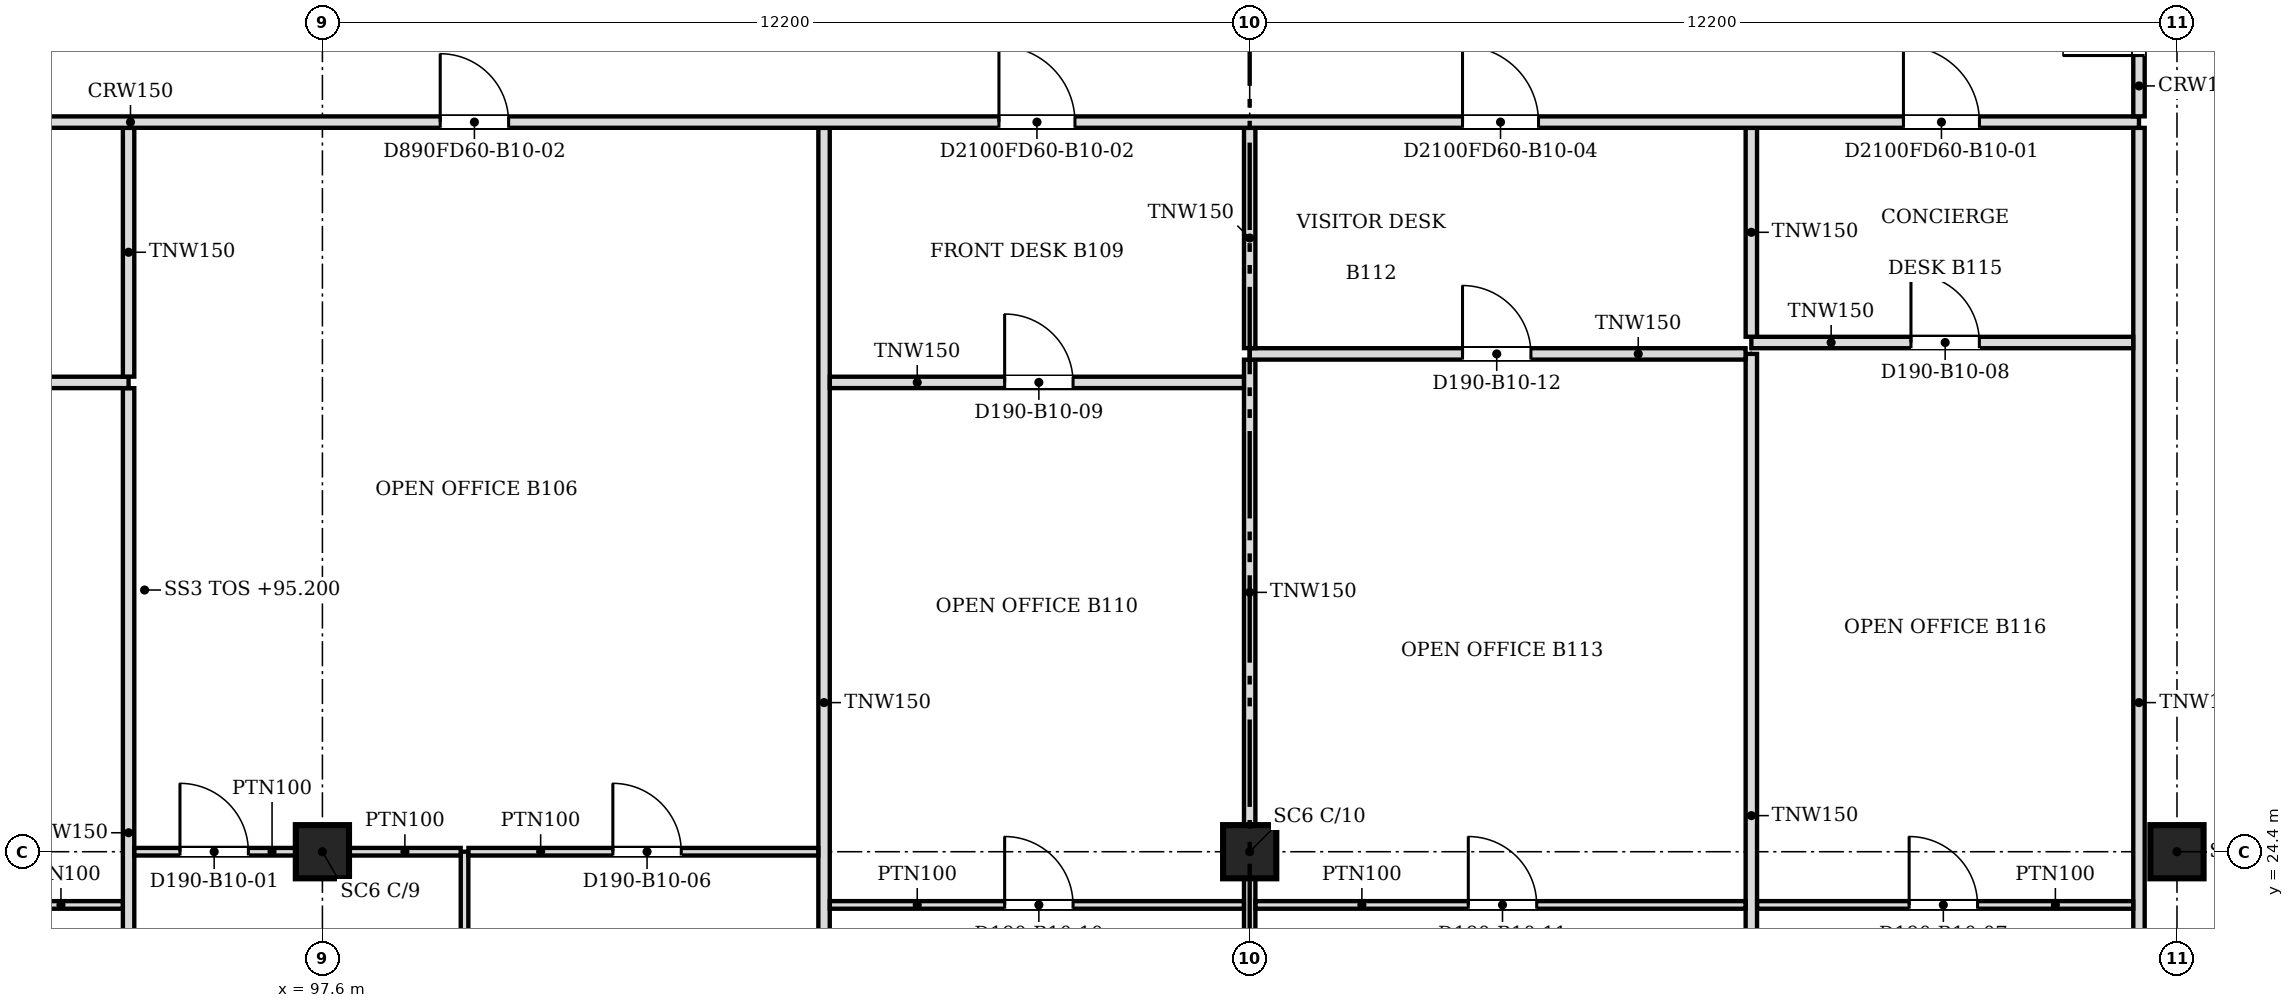
"""IFC4 building model, lengths in metres.
Left out: names, types, materials, properties, quantities, classifications, styles, units other than length and angle.
Written with IfcOpenShell. Run it as: python <this file> out.ifc"""

import sys

from ifc_helpers import new_model, si_unit, direction, frame, frame_2d, origin, origin_2d, place, context, subcontext, project, spatial, rectangle, extrude, source, transform, mapped, element, fill, save


model = new_model("IFC4")
c1 = context("Model", 3, precision=1e-05, world=origin(), true_north=direction((0.0, 1.0)))
c2 = subcontext(c1, "Body", "Model", "MODEL_VIEW")
j1 = project(units=[si_unit("LENGTHUNIT", "METRE"), si_unit("PLANEANGLEUNIT", "RADIAN")], contexts=[c1])
p1 = place(None, origin())
s1 = spatial("IfcSite", under=j1, at=p1, CompositionType="ELEMENT")
p2 = place(p1, origin())
s2 = spatial("IfcBuilding", under=s1, at=p2, CompositionType="ELEMENT")
p3 = place(p2, frame((0.0, 0.0, 95.2)))
s3 = spatial("IfcBuildingStorey", under=s2, at=p3, CompositionType="ELEMENT", Elevation=95.2)
for number, where, z_axis, x_axis in (
    (1, (97.6, 24.4, 0.0), (0.0, 0.0, 1.0), (1.0, 0.0, 0.0)),
    (2, (109.8, 24.4, 0.0), (0.0, 0.0, 1.0), (1.0, 0.0, 0.0)),
    (3, (122.0, 24.4, 0.0), (0.0, 0.0, 1.0), (1.0, 0.0, 0.0)),
):
    element("IfcColumn", number, at=place(p3, frame(where, z_axis=z_axis, x_axis=x_axis)), inside=s3, PredefinedType="COLUMN", context=c2, shape_type="SweptSolid", body=[
        extrude(rectangle(XDim=0.7, YDim=0.7, at=origin_2d()), origin(), (0.0, 0.0, 1.0), 3.6),
    ])
p4 = place(p3, frame((95.05, 18.8, 0.0), z_axis=(0.0, 0.0, 1.0), x_axis=(0.0, 1.0, 0.0)))
e4 = element("IfcWall", 4, at=p4, inside=s3, PredefinedType="PARTITIONING", context=c2, shape_type="SweptSolid", body=[
    extrude(rectangle(XDim=11.699, YDim=0.15, at=frame_2d((5.85, 0.0))), origin(), (0.0, 0.0, 1.0), 3.067),
])
p5 = place(p3, frame((99.47, 18.8, 0.0), z_axis=(0.0, 0.0, 1.0), x_axis=(0.0, 1.0, 0.0)))
e5 = element("IfcWall", 5, at=p5, inside=s3, PredefinedType="PARTITIONING", context=c2, shape_type="SweptSolid", body=[
    extrude(rectangle(XDim=5.6, YDim=0.1, at=frame_2d((2.8, 0.0))), origin(), (0.0, 0.0, 1.0), 3.067),
])
p6 = place(p3, frame((104.2, 18.8, 0.0), z_axis=(0.0, 0.0, 1.0), x_axis=(0.0, 1.0, 0.0)))
e6 = element("IfcWall", 6, at=p6, inside=s3, PredefinedType="PARTITIONING", context=c2, shape_type="SweptSolid", body=[
    extrude(rectangle(XDim=15.124, YDim=0.15, at=frame_2d((7.562, 0.0))), origin(), (0.0, 0.0, 1.0), 3.067),
])
p7 = place(p3, frame((109.8, 18.8, 0.0), z_axis=(0.0, 0.0, 1.0), x_axis=(0.0, 1.0, 0.0)))
e7 = element("IfcWall", 7, at=p7, inside=s3, PredefinedType="PARTITIONING", context=c2, shape_type="SweptSolid", body=[
    extrude(rectangle(XDim=5.249, YDim=0.15, at=frame_2d((2.625, 0.0))), origin(), (0.0, 0.0, 1.0), 3.067),
])
p8 = place(p3, frame((116.4, 18.8, 0.0), z_axis=(0.0, 0.0, 1.0), x_axis=(0.0, 1.0, 0.0)))
e8 = element("IfcWall", 8, at=p8, inside=s3, PredefinedType="PARTITIONING", context=c2, shape_type="SweptSolid", body=[
    extrude(rectangle(XDim=12.15, YDim=0.15, at=frame_2d((6.075, 0.0))), origin(), (0.0, 0.0, 1.0), 3.067),
])
p9 = place(p3, frame((121.5, 18.8, 0.0), z_axis=(0.0, 0.0, 1.0), x_axis=(0.0, 1.0, 0.0)))
e9 = element("IfcWall", 9, at=p9, inside=s3, PredefinedType="PARTITIONING", context=c2, shape_type="SweptSolid", body=[
    extrude(rectangle(XDim=15.124, YDim=0.15, at=frame_2d((7.562, 0.0))), origin(), (0.0, 0.0, 1.0), 3.067),
])
p10 = place(p3, frame((94.974, 23.7, 0.0), z_axis=(0.0, 0.0, 1.0), x_axis=(-1.0, 0.0, 0.0)))
e10 = element("IfcWall", 10, at=p10, inside=s3, PredefinedType="PARTITIONING", context=c2, shape_type="SweptSolid", body=[
    extrude(rectangle(XDim=4.128, YDim=0.1, at=frame_2d((2.064, 0.0))), origin(), (0.0, 0.0, 1.0), 3.067),
])
m1 = source(origin(), c2, "Body", "SweptSolid", [
    extrude(rectangle(XDim=0.9, YDim=2.1, at=frame_2d((0.45, 1.05))), frame((0.0, 0.06, 0.0), z_axis=(0.0, -1.0, 0.0), x_axis=(1.0, 0.0, 0.0)), (0.0, 0.0, 1.0), 0.12),
])
p11 = place(p10, frame((1.628, 0.0, 0.0)))
e11 = element("IfcOpeningElement", 11, at=p11, cuts=e10, PredefinedType="OPENING", context=c2, shape_type="MappedRepresentation", body=[
    mapped(m1, transform((0.0, 0.0, 0.0), scale=1.0)),
])
p12 = place(p3, frame((109.724, 23.7, 0.0), z_axis=(0.0, 0.0, 1.0), x_axis=(-1.0, 0.0, 0.0)))
e12 = element("IfcWall", 12, at=p12, inside=s3, PredefinedType="PARTITIONING", context=c2, shape_type="SweptSolid", body=[
    extrude(rectangle(XDim=5.448, YDim=0.1, at=frame_2d((2.724, 0.0))), origin(), (0.0, 0.0, 1.0), 3.067),
])
p13 = place(p12, frame((2.248, 0.0, 0.0)))
e13 = element("IfcOpeningElement", 13, at=p13, cuts=e12, PredefinedType="OPENING", context=c2, shape_type="MappedRepresentation", body=[
    mapped(m1, transform((0.0, 0.0, 0.0), scale=1.0)),
])
p14 = place(p3, frame((116.324, 23.7, 0.0), z_axis=(0.0, 0.0, 1.0), x_axis=(-1.0, 0.0, 0.0)))
e14 = element("IfcWall", 14, at=p14, inside=s3, PredefinedType="PARTITIONING", context=c2, shape_type="SweptSolid", body=[
    extrude(rectangle(XDim=6.448, YDim=0.1, at=frame_2d((3.224, 0.0))), origin(), (0.0, 0.0, 1.0), 3.067),
])
p15 = place(p14, frame((2.748, 0.0, 0.0)))
e15 = element("IfcOpeningElement", 15, at=p15, cuts=e14, PredefinedType="OPENING", context=c2, shape_type="MappedRepresentation", body=[
    mapped(m1, transform((0.0, 0.0, 0.0), scale=1.0)),
])
p16 = place(p3, frame((121.424, 23.7, 0.0), z_axis=(0.0, 0.0, 1.0), x_axis=(-1.0, 0.0, 0.0)))
e16 = element("IfcWall", 16, at=p16, inside=s3, PredefinedType="PARTITIONING", context=c2, shape_type="SweptSolid", body=[
    extrude(rectangle(XDim=4.948, YDim=0.1, at=frame_2d((2.474, 0.0))), origin(), (0.0, 0.0, 1.0), 3.067),
])
p17 = place(p16, frame((2.048, 0.0, 0.0)))
e17 = element("IfcOpeningElement", 17, at=p17, cuts=e16, PredefinedType="OPENING", context=c2, shape_type="MappedRepresentation", body=[
    mapped(m1, transform((0.0, 0.0, 0.0), scale=1.0)),
])
p18 = place(p3, frame((97.249, 24.4, 0.0), z_axis=(0.0, 0.0, 1.0), x_axis=(-1.0, 0.0, 0.0)))
e18 = element("IfcWall", 18, at=p18, inside=s3, PredefinedType="PARTITIONING", context=c2, shape_type="SweptSolid", body=[
    extrude(rectangle(XDim=2.123, YDim=0.1, at=frame_2d((1.062, 0.0))), origin(), (0.0, 0.0, 1.0), 3.067),
])
p19 = place(p18, frame((0.623, 0.0, 0.0)))
e19 = element("IfcOpeningElement", 19, at=p19, cuts=e18, PredefinedType="OPENING", context=c2, shape_type="MappedRepresentation", body=[
    mapped(m1, transform((0.0, 0.0, 0.0), scale=1.0)),
])
p20 = place(p3, frame((97.951, 24.4, 0.0), z_axis=(0.0, 0.0, 1.0), x_axis=(1.0, 0.0, 0.0)))
e20 = element("IfcWall", 20, at=p20, inside=s3, PredefinedType="PARTITIONING", context=c2, shape_type="SweptSolid", body=[
    extrude(rectangle(XDim=1.468, YDim=0.1, at=frame_2d((0.734, 0.0))), origin(), (0.0, 0.0, 1.0), 3.067),
])
p21 = place(p3, frame((104.124, 24.4, 0.0), z_axis=(0.0, 0.0, 1.0), x_axis=(-1.0, 0.0, 0.0)))
e21 = element("IfcWall", 21, at=p21, inside=s3, PredefinedType="PARTITIONING", context=c2, shape_type="SweptSolid", body=[
    extrude(rectangle(XDim=4.603, YDim=0.1, at=frame_2d((2.301, 0.0))), origin(), (0.0, 0.0, 1.0), 3.067),
])
p22 = place(p21, frame((1.803, 0.0, 0.0)))
e22 = element("IfcOpeningElement", 22, at=p22, cuts=e21, PredefinedType="OPENING", context=c2, shape_type="MappedRepresentation", body=[
    mapped(m1, transform((0.0, 0.0, 0.0), scale=1.0)),
])
p23 = place(p3, frame((109.8, 24.751, 0.0), z_axis=(0.0, 0.0, 1.0), x_axis=(0.0, 1.0, 0.0)))
e23 = element("IfcWall", 23, at=p23, inside=s3, PredefinedType="PARTITIONING", context=c2, shape_type="SweptSolid", body=[
    extrude(rectangle(XDim=6.123, YDim=0.15, at=frame_2d((3.062, 0.0))), origin(), (0.0, 0.0, 1.0), 3.067),
])
p24 = place(p3, frame((95.05, 30.575, 0.0), z_axis=(0.0, 0.0, 1.0), x_axis=(-1.0, 0.0, 0.0)))
e24 = element("IfcWall", 24, at=p24, inside=s3, PredefinedType="PARTITIONING", context=c2, shape_type="SweptSolid", body=[
    extrude(rectangle(XDim=9.15, YDim=0.15, at=frame_2d((4.575, 0.0))), origin(), (0.0, 0.0, 1.0), 3.067),
])
m2 = source(origin(), c2, "Body", "SweptSolid", [
    extrude(rectangle(XDim=0.9, YDim=2.1, at=frame_2d((0.45, 1.05))), frame((0.0, 0.085, 0.0), z_axis=(0.0, -1.0, 0.0), x_axis=(1.0, 0.0, 0.0)), (0.0, 0.0, 1.0), 0.17),
])
p25 = place(p24, frame((4.15, 0.0, 0.0)))
e25 = element("IfcOpeningElement", 25, at=p25, cuts=e24, PredefinedType="OPENING", context=c2, shape_type="MappedRepresentation", body=[
    mapped(m2, transform((0.0, 0.0, 0.0), scale=1.0)),
])
p26 = place(p3, frame((109.724, 30.575, 0.0), z_axis=(0.0, 0.0, 1.0), x_axis=(-1.0, 0.0, 0.0)))
e26 = element("IfcWall", 26, at=p26, inside=s3, PredefinedType="PARTITIONING", context=c2, shape_type="SweptSolid", body=[
    extrude(rectangle(XDim=5.448, YDim=0.15, at=frame_2d((2.724, 0.0))), origin(), (0.0, 0.0, 1.0), 3.067),
])
p27 = place(p26, frame((2.248, 0.0, 0.0)))
e27 = element("IfcOpeningElement", 27, at=p27, cuts=e26, PredefinedType="OPENING", context=c2, shape_type="MappedRepresentation", body=[
    mapped(m2, transform((0.0, 0.0, 0.0), scale=1.0)),
])
p28 = place(p3, frame((95.05, 30.651, 0.0), z_axis=(0.0, 0.0, 1.0), x_axis=(0.0, 1.0, 0.0)))
e28 = element("IfcWall", 28, at=p28, inside=s3, PredefinedType="PARTITIONING", context=c2, shape_type="SweptSolid", body=[
    extrude(rectangle(XDim=3.273, YDim=0.15, at=frame_2d((1.637, 0.0))), origin(), (0.0, 0.0, 1.0), 3.067),
])
p29 = place(p3, frame((116.324, 30.95, 0.0), z_axis=(0.0, 0.0, 1.0), x_axis=(-1.0, 0.0, 0.0)))
e29 = element("IfcWall", 29, at=p29, inside=s3, PredefinedType="PARTITIONING", context=c2, shape_type="SweptSolid", body=[
    extrude(rectangle(XDim=6.524, YDim=0.15, at=frame_2d((3.262, 0.0))), origin(), (0.0, 0.0, 1.0), 3.067),
])
p30 = place(p29, frame((2.824, 0.0, 0.0)))
e30 = element("IfcOpeningElement", 30, at=p30, cuts=e29, PredefinedType="OPENING", context=c2, shape_type="MappedRepresentation", body=[
    mapped(m2, transform((0.0, 0.0, 0.0), scale=1.0)),
])
p31 = place(p3, frame((109.8, 31.026, 0.0), z_axis=(0.0, 0.0, 1.0), x_axis=(0.0, 1.0, 0.0)))
e31 = element("IfcWall", 31, at=p31, inside=s3, PredefinedType="PARTITIONING", context=c2, shape_type="SweptSolid", body=[
    extrude(rectangle(XDim=2.898, YDim=0.15, at=frame_2d((1.449, 0.0))), origin(), (0.0, 0.0, 1.0), 3.067),
])
p32 = place(p3, frame((121.424, 31.1, 0.0), z_axis=(0.0, 0.0, 1.0), x_axis=(-1.0, 0.0, 0.0)))
e32 = element("IfcWall", 32, at=p32, inside=s3, PredefinedType="PARTITIONING", context=c2, shape_type="SweptSolid", body=[
    extrude(rectangle(XDim=5.024, YDim=0.15, at=frame_2d((2.512, 0.0))), origin(), (0.0, 0.0, 1.0), 3.067),
])
p33 = place(p32, frame((2.024, 0.0, 0.0)))
e33 = element("IfcOpeningElement", 33, at=p33, cuts=e32, PredefinedType="OPENING", context=c2, shape_type="MappedRepresentation", body=[
    mapped(m2, transform((0.0, 0.0, 0.0), scale=1.0)),
])
p34 = place(p3, frame((116.4, 31.176, 0.0), z_axis=(0.0, 0.0, 1.0), x_axis=(0.0, 1.0, 0.0)))
e34 = element("IfcWall", 34, at=p34, inside=s3, PredefinedType="PARTITIONING", context=c2, shape_type="SweptSolid", body=[
    extrude(rectangle(XDim=2.748, YDim=0.15, at=frame_2d((1.374, 0.0))), origin(), (0.0, 0.0, 1.0), 3.067),
])
p35 = place(p3, frame((121.5, 34.0, 0.0), z_axis=(0.0, 0.0, 1.0), x_axis=(-1.0, 0.0, 0.0)))
e35 = element("IfcWall", 35, at=p35, inside=s3, PredefinedType="PARTITIONING", context=c2, shape_type="SweptSolid", body=[
    extrude(rectangle(XDim=35.6, YDim=0.15, at=frame_2d((17.8, 0.0))), origin(), (0.0, 0.0, 1.0), 3.067),
])
m3 = source(origin(), c2, "Body", "SweptSolid", [
    extrude(rectangle(XDim=1.0, YDim=2.1, at=frame_2d((0.5, 1.05))), frame((0.0, 0.085, 0.0), z_axis=(0.0, -1.0, 0.0), x_axis=(1.0, 0.0, 0.0)), (0.0, 0.0, 1.0), 0.17),
])
p36 = place(p35, frame((2.099, 0.0, 0.0)))
e36 = element("IfcOpeningElement", 36, at=p36, cuts=e35, PredefinedType="OPENING", context=c2, shape_type="MappedRepresentation", body=[
    mapped(m3, transform((0.0, 0.0, 0.0), scale=1.0)),
])
p37 = place(p35, frame((13.999, 0.0, 0.0)))
e37 = element("IfcOpeningElement", 37, at=p37, cuts=e35, PredefinedType="OPENING", context=c2, shape_type="MappedRepresentation", body=[
    mapped(m3, transform((0.0, 0.0, 0.0), scale=1.0)),
])
p38 = place(p35, frame((7.9, 0.0, 0.0)))
e38 = element("IfcOpeningElement", 38, at=p38, cuts=e35, PredefinedType="OPENING", context=c2, shape_type="MappedRepresentation", body=[
    mapped(m3, transform((0.0, 0.0, 0.0), scale=1.0)),
])
p39 = place(p35, frame((30.5, 0.0, 0.0)))
e39 = element("IfcOpeningElement", 39, at=p39, cuts=e35, PredefinedType="OPENING", context=c2, shape_type="MappedRepresentation", body=[
    mapped(m3, transform((0.0, 0.0, 0.0), scale=1.0)),
])
p40 = place(p35, frame((21.45, 0.0, 0.0)))
e40 = element("IfcOpeningElement", 40, at=p40, cuts=e35, PredefinedType="OPENING", context=c2, shape_type="MappedRepresentation", body=[
    mapped(m2, transform((0.0, 0.0, 0.0), scale=1.0)),
])
p41 = place(p3, frame((121.5, 36.6, 0.0), z_axis=(0.0, 0.0, 1.0), x_axis=(0.0, -1.0, 0.0)))
e41 = element("IfcWall", 41, at=p41, inside=s3, PredefinedType="PARTITIONING", context=c2, shape_type="SweptSolid", body=[
    extrude(rectangle(XDim=2.524, YDim=0.15, at=frame_2d((1.262, 0.0))), origin(), (0.0, 0.0, 1.0), 3.067),
])
p42 = place(p41, frame((0.724, 0.0, 0.0)))
e42 = element("IfcOpeningElement", 42, at=p42, cuts=e41, PredefinedType="OPENING", context=c2, shape_type="MappedRepresentation", body=[
    mapped(m3, transform((0.0, 0.0, 0.0), scale=1.0)),
])
m4 = source(origin(), c2, "Body", "SweptSolid", [
    extrude(rectangle(XDim=0.9, YDim=2.1, at=frame_2d((0.45, 1.05))), frame((0.0, 0.025, 0.0), z_axis=(0.0, -1.0, 0.0), x_axis=(1.0, 0.0, 0.0)), (0.0, 0.0, 1.0), 0.05),
])
p43 = place(p19, origin())
e43 = element("IfcDoor", 43, at=p43, inside=s3, OperationType="SINGLE_SWING_RIGHT", PredefinedType="DOOR", context=c2, shape_type="MappedRepresentation", body=[
    mapped(m4, transform((0.0, 0.0, 0.0), scale=1.0)),
])
fill(e19, e43)
p44 = place(p22, origin())
e44 = element("IfcDoor", 44, at=p44, inside=s3, OperationType="SINGLE_SWING_RIGHT", PredefinedType="DOOR", context=c2, shape_type="MappedRepresentation", body=[
    mapped(m4, transform((0.0, 0.0, 0.0), scale=1.0)),
])
fill(e22, e44)
p45 = place(p17, origin())
e45 = element("IfcDoor", 45, at=p45, inside=s3, OperationType="SINGLE_SWING_RIGHT", PredefinedType="DOOR", context=c2, shape_type="MappedRepresentation", body=[
    mapped(m4, transform((0.0, 0.0, 0.0), scale=1.0)),
])
fill(e17, e45)
p46 = place(p33, origin())
e46 = element("IfcDoor", 46, at=p46, inside=s3, OperationType="SINGLE_SWING_RIGHT", PredefinedType="DOOR", context=c2, shape_type="MappedRepresentation", body=[
    mapped(m4, transform((0.0, 0.0, 0.0), scale=1.0)),
])
fill(e33, e46)
m5 = source(origin(), c2, "Body", "SweptSolid", [
    extrude(rectangle(XDim=1.0, YDim=2.1, at=frame_2d((0.5, 1.05))), frame((0.0, 0.025, 0.0), z_axis=(0.0, -1.0, 0.0), x_axis=(1.0, 0.0, 0.0)), (0.0, 0.0, 1.0), 0.05),
])
p47 = place(p36, origin())
e47 = element("IfcDoor", 47, at=p47, inside=s3, OperationType="SINGLE_SWING_RIGHT", PredefinedType="DOOR", context=c2, shape_type="MappedRepresentation", body=[
    mapped(m5, transform((0.0, 0.0, 0.0), scale=1.0)),
])
fill(e36, e47)
p48 = place(p27, origin())
e48 = element("IfcDoor", 48, at=p48, inside=s3, OperationType="SINGLE_SWING_RIGHT", PredefinedType="DOOR", context=c2, shape_type="MappedRepresentation", body=[
    mapped(m4, transform((0.0, 0.0, 0.0), scale=1.0)),
])
fill(e27, e48)
p49 = place(p13, origin())
e49 = element("IfcDoor", 49, at=p49, inside=s3, OperationType="SINGLE_SWING_RIGHT", PredefinedType="DOOR", context=c2, shape_type="MappedRepresentation", body=[
    mapped(m4, transform((0.0, 0.0, 0.0), scale=1.0)),
])
fill(e13, e49)
p50 = place(p37, origin())
e50 = element("IfcDoor", 50, at=p50, inside=s3, OperationType="SINGLE_SWING_RIGHT", PredefinedType="DOOR", context=c2, shape_type="MappedRepresentation", body=[
    mapped(m5, transform((0.0, 0.0, 0.0), scale=1.0)),
])
fill(e37, e50)
p51 = place(p15, origin())
e51 = element("IfcDoor", 51, at=p51, inside=s3, OperationType="SINGLE_SWING_RIGHT", PredefinedType="DOOR", context=c2, shape_type="MappedRepresentation", body=[
    mapped(m4, transform((0.0, 0.0, 0.0), scale=1.0)),
])
fill(e15, e51)
p52 = place(p30, origin())
e52 = element("IfcDoor", 52, at=p52, inside=s3, OperationType="SINGLE_SWING_RIGHT", PredefinedType="DOOR", context=c2, shape_type="MappedRepresentation", body=[
    mapped(m4, transform((0.0, 0.0, 0.0), scale=1.0)),
])
fill(e30, e52)
p53 = place(p38, origin())
e53 = element("IfcDoor", 53, at=p53, inside=s3, OperationType="SINGLE_SWING_RIGHT", PredefinedType="DOOR", context=c2, shape_type="MappedRepresentation", body=[
    mapped(m5, transform((0.0, 0.0, 0.0), scale=1.0)),
])
fill(e38, e53)
p54 = place(p40, origin())
e54 = element("IfcDoor", 54, at=p54, inside=s3, OperationType="SINGLE_SWING_RIGHT", PredefinedType="DOOR", context=c2, shape_type="MappedRepresentation", body=[
    mapped(m4, transform((0.0, 0.0, 0.0), scale=1.0)),
])
fill(e40, e54)
p55 = place(p42, origin())
e55 = element("IfcDoor", 55, at=p55, inside=s3, OperationType="SINGLE_SWING_RIGHT", PredefinedType="DOOR", context=c2, shape_type="MappedRepresentation", body=[
    mapped(m5, transform((0.0, 0.0, 0.0), scale=1.0)),
])
fill(e42, e55)
save(model, sys.argv[1])
